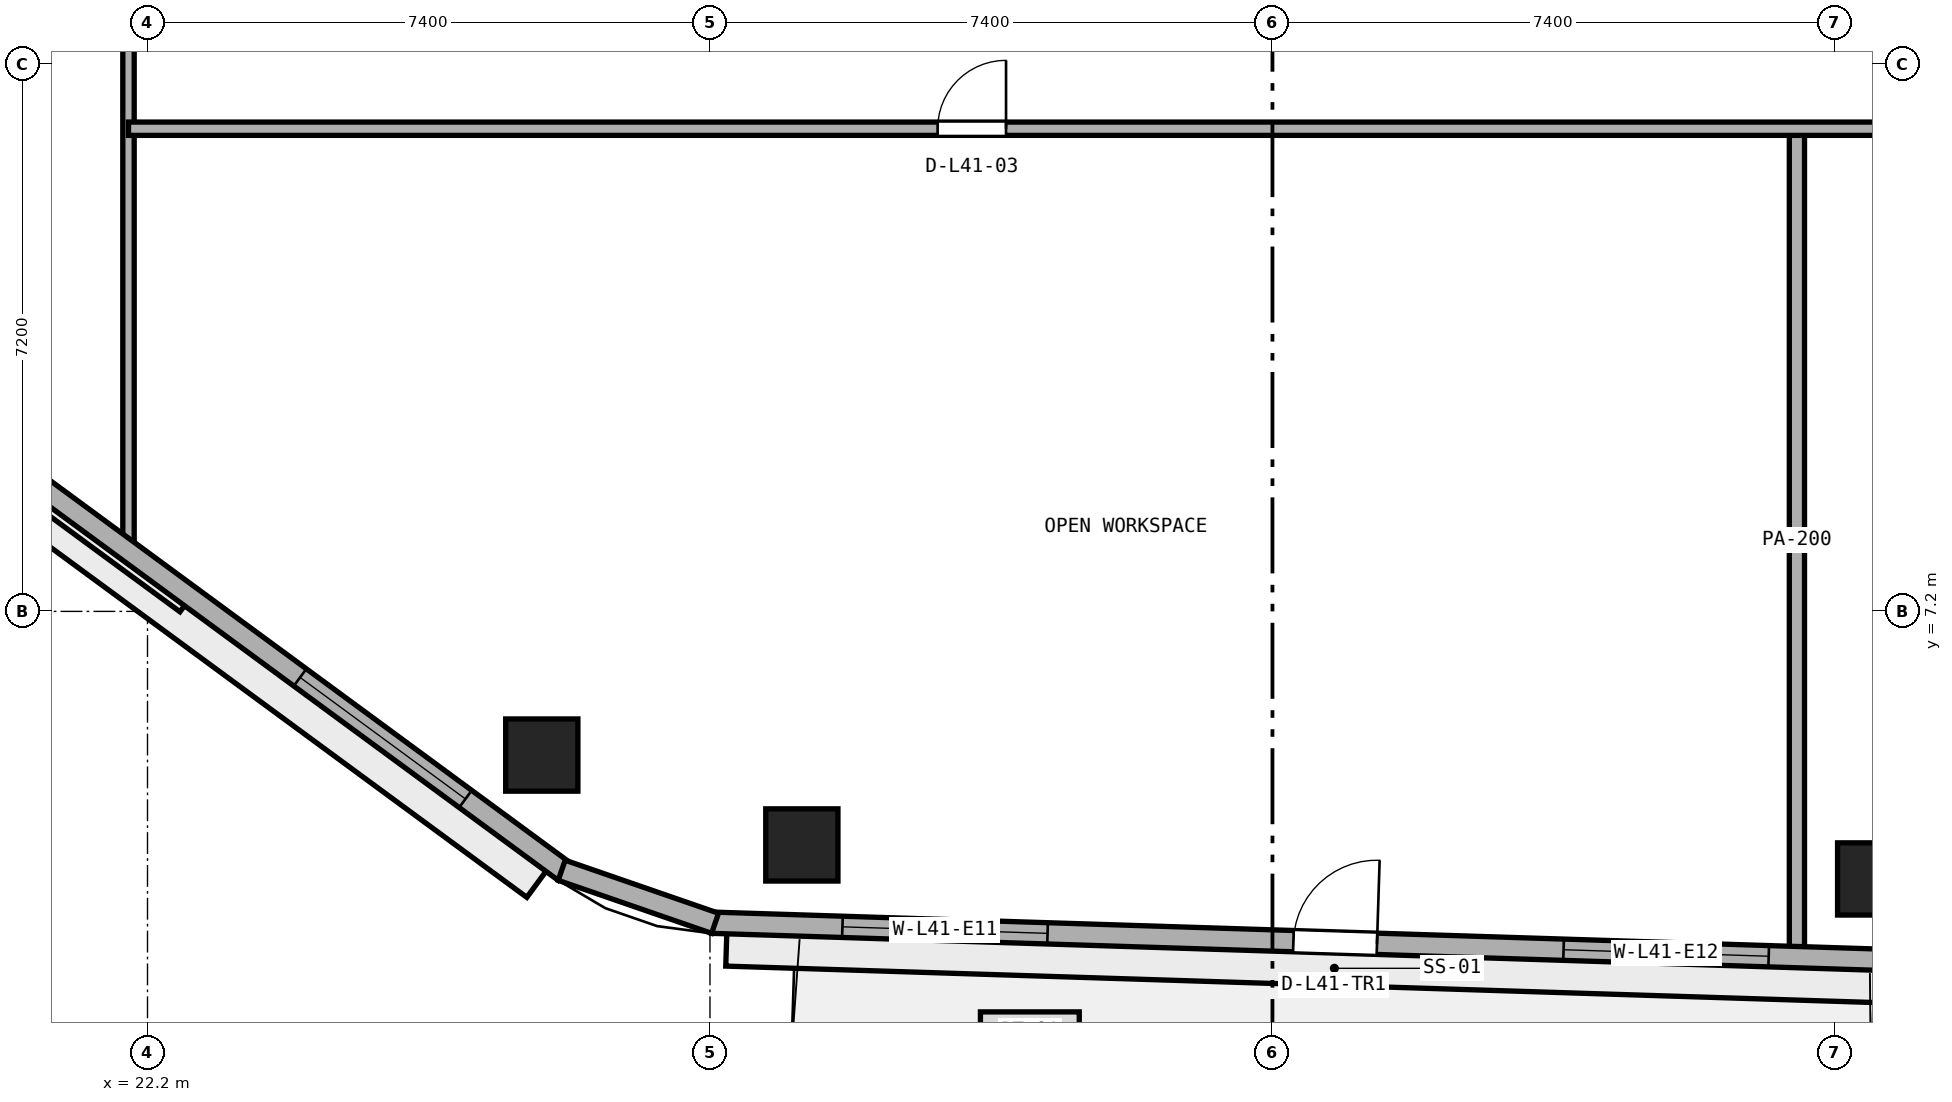
"""IFC4 building model, lengths in metres.
Left out: names, types, materials, properties, quantities, classifications, styles, units other than length and angle.
Written with IfcOpenShell. Run it as: python <this file> out.ifc"""

import sys

from ifc_helpers import new_model, si_unit, direction, frame, frame_2d, origin, origin_2d, place, context, subcontext, project, spatial, rectangle, extrude, element, fill, save


model = new_model("IFC4")
c1 = context("Model", 3, precision=1e-05, world=origin(), true_north=direction((0.0, 1.0)))
c2 = subcontext(c1, "Body", "Model", "MODEL_VIEW")
j1 = project(units=[si_unit("LENGTHUNIT", "METRE"), si_unit("PLANEANGLEUNIT", "RADIAN")], contexts=[c1])
p1 = place(None, origin())
s1 = spatial("IfcSite", under=j1, at=p1, CompositionType="ELEMENT")
p2 = place(p1, origin())
s2 = spatial("IfcBuilding", under=s1, at=p2, CompositionType="ELEMENT")
p3 = place(p2, frame((0.0, 0.0, 163.0)))
s3 = spatial("IfcBuildingStorey", under=s2, at=p3, CompositionType="ELEMENT", Elevation=163.0)
for number, where, z_axis, x_axis in (
    (1, (30.809, 4.127, 0.0), (0.0, 0.0, 1.0), (1.0, 0.0, 0.0)),
    (2, (44.91, 3.68, 0.0), (0.0, 0.0, 1.0), (1.0, 0.0, 0.0)),
    (3, (27.387, 5.31, 0.0), (0.0, 0.0, 1.0), (1.0, 0.0, 0.0)),
):
    element("IfcColumn", number, at=place(p3, frame(where, z_axis=z_axis, x_axis=x_axis)), inside=s3, PredefinedType="COLUMN", context=c2, shape_type="SweptSolid", body=[
        extrude(rectangle(XDim=0.95, YDim=0.95, at=origin_2d()), origin(), (0.0, 0.0, 1.0), 3.8),
    ])
p4 = place(p3, frame((43.9, 2.717, 0.0), z_axis=(0.0, 0.0, 1.0), x_axis=(0.0, 1.0, 0.0)))
e4 = element("IfcWall", 4, at=p4, inside=s3, PredefinedType="PARTITIONING", context=c2, shape_type="SweptSolid", body=[
    extrude(rectangle(XDim=10.833, YDim=0.2, at=frame_2d((5.417, 0.0))), origin(), (0.0, 0.0, 1.0), 3.54),
])
p5 = place(p3, frame((21.95, 7.957, 0.0), z_axis=(0.0, 0.0, 1.0), x_axis=(0.0, 1.0, 0.0)))
e5 = element("IfcWall", 5, at=p5, inside=s3, PredefinedType="PARTITIONING", context=c2, shape_type="SweptSolid", body=[
    extrude(rectangle(XDim=15.894, YDim=0.15, at=frame_2d((7.947, 0.0))), origin(), (0.0, 0.0, 1.0), 3.54),
])
p6 = place(p5, frame((7.118, 0.0, 0.0)))
e6 = element("IfcOpeningElement", 6, at=p6, cuts=e5, PredefinedType="OPENING", context=c2, shape_type="SweptSolid", body=[
    extrude(rectangle(XDim=0.9, YDim=2.1, at=frame_2d((0.45, 1.05))), frame((0.0, 0.085, 0.0), z_axis=(0.0, -1.0, 0.0), x_axis=(1.0, 0.0, 0.0)), (0.0, 0.0, 1.0), 0.17),
])
p7 = place(p3, frame((21.95, 13.55, 0.0), z_axis=(0.0, 0.0, 1.0), x_axis=(1.0, 0.0, 0.0)))
e7 = element("IfcWall", 7, at=p7, inside=s3, PredefinedType="PARTITIONING", context=c2, shape_type="SweptSolid", body=[
    extrude(rectangle(XDim=30.1, YDim=0.175, at=frame_2d((15.05, 0.0))), origin(), (0.0, 0.0, 1.0), 3.54),
])
p8 = place(p7, frame((10.645, 0.0, 0.0)))
e8 = element("IfcOpeningElement", 8, at=p8, cuts=e7, PredefinedType="OPENING", context=c2, shape_type="SweptSolid", body=[
    extrude(rectangle(XDim=0.9, YDim=2.1, at=frame_2d((0.45, 1.05))), frame((0.0, 0.097, 0.0), z_axis=(0.0, -1.0, 0.0), x_axis=(1.0, 0.0, 0.0)), (0.0, 0.0, 1.0), 0.195),
])
p9 = place(p7, frame((25.455, 0.0, 0.0)))
e9 = element("IfcOpeningElement", 9, at=p9, cuts=e7, PredefinedType="OPENING", context=c2, shape_type="SweptSolid", body=[
    extrude(rectangle(XDim=0.9, YDim=2.1, at=frame_2d((0.45, 1.05))), frame((0.0, 0.097, 0.0), z_axis=(0.0, -1.0, 0.0), x_axis=(1.0, 0.0, 0.0)), (0.0, 0.0, 1.0), 0.195),
])
p10 = place(p3, frame((29.625, 3.104, 0.0), z_axis=(0.0, 0.0, 1.0), x_axis=(0.99949718661, -0.031707632487, 0.0)))
e10 = element("IfcWall", 10, at=p10, inside=s3, PredefinedType="STANDARD", context=c2, shape_type="SweptSolid", body=[
    extrude(rectangle(XDim=16.408, YDim=0.28, at=frame_2d((8.204, 0.0))), origin(), (0.0, 0.0, 1.0), 3.54),
])
p11 = place(p10, frame((7.654, 0.0, 0.0)))
e11 = element("IfcOpeningElement", 11, at=p11, cuts=e10, PredefinedType="OPENING", context=c2, shape_type="SweptSolid", body=[
    extrude(rectangle(XDim=1.1, YDim=2.2, at=frame_2d((0.55, 1.1))), frame((0.0, 0.15, 0.0), z_axis=(0.0, -1.0, 0.0), x_axis=(1.0, 0.0, 0.0)), (0.0, 0.0, 1.0), 0.3),
])
p12 = place(p10, frame((1.718, 0.0, 0.9)))
e12 = element("IfcOpeningElement", 12, at=p12, cuts=e10, PredefinedType="OPENING", context=c2, shape_type="SweptSolid", body=[
    extrude(rectangle(XDim=2.7, YDim=1.75, at=frame_2d((1.35, 0.875))), frame((0.0, 0.15, 0.0), z_axis=(0.0, -1.0, 0.0), x_axis=(1.0, 0.0, 0.0)), (0.0, 0.0, 1.0), 0.3),
])
p13 = place(p10, frame((11.21, 0.0, 0.9)))
e13 = element("IfcOpeningElement", 13, at=p13, cuts=e10, PredefinedType="OPENING", context=c2, shape_type="SweptSolid", body=[
    extrude(rectangle(XDim=2.7, YDim=1.75, at=frame_2d((1.35, 0.875))), frame((0.0, 0.15, 0.0), z_axis=(0.0, -1.0, 0.0), x_axis=(1.0, 0.0, 0.0)), (0.0, 0.0, 1.0), 0.3),
])
p14 = place(p3, frame((14.951, 13.134, 0.0), z_axis=(0.0, 0.0, 1.0), x_axis=(0.805804940328, -0.592181051827, 0.0)))
e14 = element("IfcWall", 14, at=p14, inside=s3, PredefinedType="STANDARD", context=c2, shape_type="SweptSolid", body=[
    extrude(rectangle(XDim=15.804, YDim=0.28, at=frame_2d((7.902, 0.0))), origin(), (0.0, 0.0, 1.0), 3.54),
])
p15 = place(p14, frame((1.617, 0.0, 0.9)))
e15 = element("IfcOpeningElement", 15, at=p15, cuts=e14, PredefinedType="OPENING", context=c2, shape_type="SweptSolid", body=[
    extrude(rectangle(XDim=2.7, YDim=1.75, at=frame_2d((1.35, 0.875))), frame((0.0, 0.15, 0.0), z_axis=(0.0, -1.0, 0.0), x_axis=(1.0, 0.0, 0.0)), (0.0, 0.0, 1.0), 0.3),
])
p16 = place(p14, frame((11.487, 0.0, 0.9)))
e16 = element("IfcOpeningElement", 16, at=p16, cuts=e14, PredefinedType="OPENING", context=c2, shape_type="SweptSolid", body=[
    extrude(rectangle(XDim=2.7, YDim=1.75, at=frame_2d((1.35, 0.875))), frame((0.0, 0.15, 0.0), z_axis=(0.0, -1.0, 0.0), x_axis=(1.0, 0.0, 0.0)), (0.0, 0.0, 1.0), 0.3),
])
p17 = place(p3, frame((27.649, 3.794, 0.0), z_axis=(0.0, 0.0, 1.0), x_axis=(0.945149124969, -0.326639145802, 0.0)))
e17 = element("IfcWall", 17, at=p17, inside=s3, PredefinedType="STANDARD", context=c2, shape_type="SweptSolid", body=[
    extrude(rectangle(XDim=2.135, YDim=0.28, at=frame_2d((1.067, 0.0))), origin(), (0.0, 0.0, 1.0), 3.54),
])
p18 = place(p8, origin())
e18 = element("IfcDoor", 18, at=p18, inside=s3, OperationType="SINGLE_SWING_RIGHT", PredefinedType="DOOR", context=c2, shape_type="SweptSolid", body=[
    extrude(rectangle(XDim=0.9, YDim=2.1, at=frame_2d((0.45, 1.05))), frame((0.0, 0.025, 0.0), z_axis=(0.0, -1.0, 0.0), x_axis=(1.0, 0.0, 0.0)), (0.0, 0.0, 1.0), 0.05),
])
fill(e8, e18)
p19 = place(p11, origin())
e19 = element("IfcDoor", 19, at=p19, inside=s3, OperationType="SINGLE_SWING_RIGHT", PredefinedType="DOOR", context=c2, shape_type="SweptSolid", body=[
    extrude(rectangle(XDim=1.1, YDim=2.2, at=frame_2d((0.55, 1.1))), frame((0.0, 0.025, 0.0), z_axis=(0.0, -1.0, 0.0), x_axis=(1.0, 0.0, 0.0)), (0.0, 0.0, 1.0), 0.05),
])
fill(e11, e19)
p20 = place(p12, origin())
e20 = element("IfcWindow", 20, at=p20, inside=s3, PartitioningType="SINGLE_PANEL", PredefinedType="WINDOW", context=c2, shape_type="SweptSolid", body=[
    extrude(rectangle(XDim=2.7, YDim=1.75, at=frame_2d((1.35, 0.875))), frame((0.0, 0.03, 0.0), z_axis=(0.0, -1.0, 0.0), x_axis=(1.0, 0.0, 0.0)), (0.0, 0.0, 1.0), 0.06),
])
fill(e12, e20)
p21 = place(p13, origin())
e21 = element("IfcWindow", 21, at=p21, inside=s3, PartitioningType="SINGLE_PANEL", PredefinedType="WINDOW", context=c2, shape_type="SweptSolid", body=[
    extrude(rectangle(XDim=2.7, YDim=1.75, at=frame_2d((1.35, 0.875))), frame((0.0, 0.03, 0.0), z_axis=(0.0, -1.0, 0.0), x_axis=(1.0, 0.0, 0.0)), (0.0, 0.0, 1.0), 0.06),
])
fill(e13, e21)
p22 = place(p16, origin())
e22 = element("IfcWindow", 22, at=p22, inside=s3, PartitioningType="SINGLE_PANEL", PredefinedType="WINDOW", context=c2, shape_type="SweptSolid", body=[
    extrude(rectangle(XDim=2.7, YDim=1.75, at=frame_2d((1.35, 0.875))), frame((0.0, 0.03, 0.0), z_axis=(0.0, -1.0, 0.0), x_axis=(1.0, 0.0, 0.0)), (0.0, 0.0, 1.0), 0.06),
])
fill(e16, e22)
save(model, sys.argv[1])
